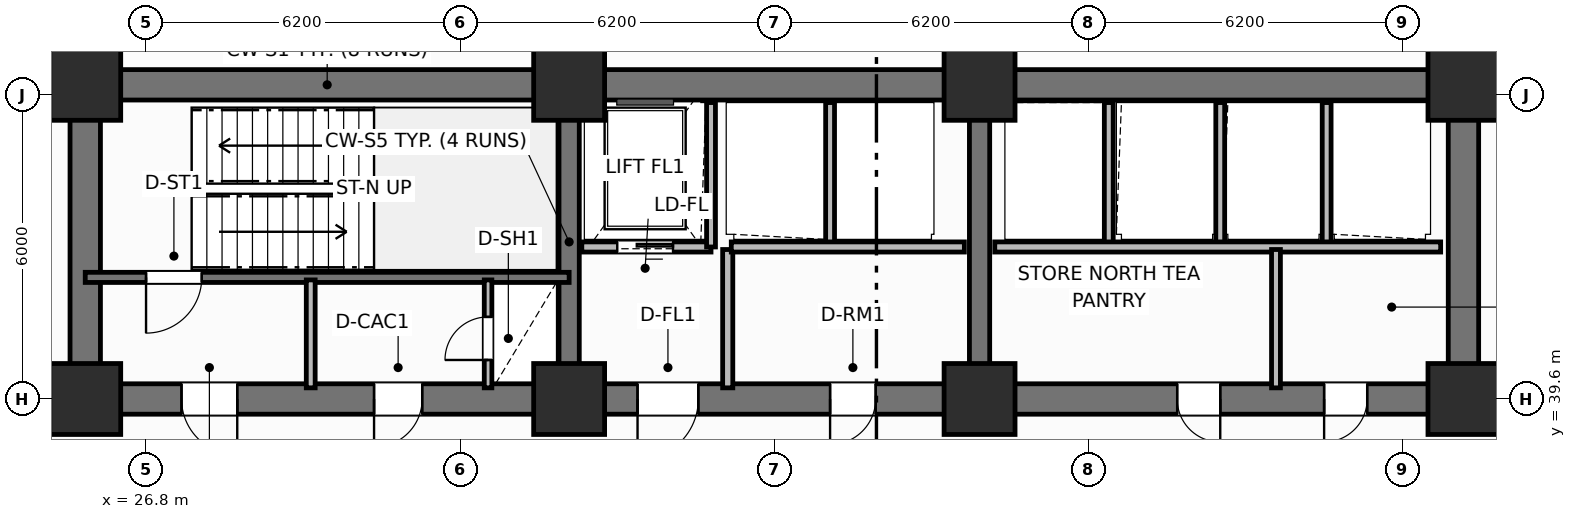
"""IFC4 building model, lengths in metres.
Left out: names, types, materials, properties, quantities, classifications, styles, units other than length and angle.
Written with IfcOpenShell. Run it as: python <this file> out.ifc"""

import sys

from ifc_helpers import new_model, si_unit, direction, frame, frame_2d, origin, origin_2d, place, context, subcontext, project, spatial, rectangle, extrude, element, fill, save


model = new_model("IFC4")
c1 = context("Model", 3, precision=1e-05, world=origin(), true_north=direction((0.0, 1.0)))
c2 = subcontext(c1, "Body", "Model", "MODEL_VIEW")
j1 = project(units=[si_unit("LENGTHUNIT", "METRE"), si_unit("PLANEANGLEUNIT", "RADIAN")], contexts=[c1])
p1 = place(None, origin())
s1 = spatial("IfcSite", under=j1, at=p1, CompositionType="ELEMENT")
p2 = place(p1, origin())
s2 = spatial("IfcBuilding", under=s1, at=p2, CompositionType="ELEMENT")
p3 = place(p2, frame((0.0, 0.0, 20.1)))
s3 = spatial("IfcBuildingStorey", under=s2, at=p3, CompositionType="ELEMENT", Elevation=20.1)
p4 = place(p3, frame((25.6, 45.8, 0.0), z_axis=(0.0, 0.0, 1.0), x_axis=(1.0, 0.0, 0.0)))
e1 = element("IfcWall", 1, at=p4, inside=s3, PredefinedType="SHEAR", context=c2, shape_type="SweptSolid", body=[
    extrude(rectangle(XDim=27.2, YDim=0.6, at=frame_2d((13.6, 0.0))), origin(), (0.0, 0.0, 1.0), 4.5),
])
for number, where, z_axis, x_axis in (
    (2, (25.6, 39.9, 0.0), (0.0, 0.0, 1.0), (0.0, 1.0, 0.0)),
    (3, (52.8, 39.9, 0.0), (0.0, 0.0, 1.0), (0.0, 1.0, 0.0)),
):
    element("IfcWall", number, at=place(p3, frame(where, z_axis=z_axis, x_axis=x_axis)), inside=s3, PredefinedType="SHEAR", context=c2, shape_type="SweptSolid", body=[
        extrude(rectangle(XDim=5.6, YDim=0.6, at=frame_2d((2.8, 0.0))), origin(), (0.0, 0.0, 1.0), 4.5),
    ])
p5 = place(p3, frame((52.8, 39.6, 0.0), z_axis=(0.0, 0.0, 1.0), x_axis=(-1.0, 0.0, 0.0)))
e4 = element("IfcWall", 4, at=p5, inside=s3, PredefinedType="SHEAR", context=c2, shape_type="SweptSolid", body=[
    extrude(rectangle(XDim=27.2, YDim=0.6, at=frame_2d((13.6, 0.0))), origin(), (0.0, 0.0, 1.0), 4.5),
])
p6 = place(p5, frame((24.2, 0.0, 0.0)))
e5 = element("IfcOpeningElement", 5, at=p6, cuts=e4, PredefinedType="OPENING", context=c2, shape_type="SweptSolid", body=[
    extrude(rectangle(XDim=1.1, YDim=2.15, at=frame_2d((0.55, 1.075))), frame((0.0, 0.31, 0.0), z_axis=(0.0, -1.0, 0.0), x_axis=(1.0, 0.0, 0.0)), (0.0, 0.0, 1.0), 0.62),
])
p7 = place(p5, frame((20.55, 0.0, 0.0)))
e6 = element("IfcOpeningElement", 6, at=p7, cuts=e4, PredefinedType="OPENING", context=c2, shape_type="SweptSolid", body=[
    extrude(rectangle(XDim=0.95, YDim=2.1, at=frame_2d((0.475, 1.05))), frame((0.0, 0.31, 0.0), z_axis=(0.0, -1.0, 0.0), x_axis=(1.0, 0.0, 0.0)), (0.0, 0.0, 1.0), 0.62),
])
p8 = place(p5, frame((15.1, 0.0, 0.0)))
e7 = element("IfcOpeningElement", 7, at=p8, cuts=e4, PredefinedType="OPENING", context=c2, shape_type="SweptSolid", body=[
    extrude(rectangle(XDim=1.2, YDim=2.15, at=frame_2d((0.6, 1.075))), frame((0.0, 0.31, 0.0), z_axis=(0.0, -1.0, 0.0), x_axis=(1.0, 0.0, 0.0)), (0.0, 0.0, 1.0), 0.62),
])
p9 = place(p5, frame((11.6, 0.0, 0.0)))
e8 = element("IfcOpeningElement", 8, at=p9, cuts=e4, PredefinedType="OPENING", context=c2, shape_type="SweptSolid", body=[
    extrude(rectangle(XDim=0.9, YDim=2.1, at=frame_2d((0.45, 1.05))), frame((0.0, 0.31, 0.0), z_axis=(0.0, -1.0, 0.0), x_axis=(1.0, 0.0, 0.0)), (0.0, 0.0, 1.0), 0.62),
])
p10 = place(p5, frame((4.8, 0.0, 0.0)))
e9 = element("IfcOpeningElement", 9, at=p10, cuts=e4, PredefinedType="OPENING", context=c2, shape_type="SweptSolid", body=[
    extrude(rectangle(XDim=0.85, YDim=2.1, at=frame_2d((0.425, 1.05))), frame((0.0, 0.31, 0.0), z_axis=(0.0, -1.0, 0.0), x_axis=(1.0, 0.0, 0.0)), (0.0, 0.0, 1.0), 0.62),
])
p11 = place(p5, frame((1.9, 0.0, 0.0)))
e10 = element("IfcOpeningElement", 10, at=p11, cuts=e4, PredefinedType="OPENING", context=c2, shape_type="SweptSolid", body=[
    extrude(rectangle(XDim=0.85, YDim=2.1, at=frame_2d((0.425, 1.05))), frame((0.0, 0.31, 0.0), z_axis=(0.0, -1.0, 0.0), x_axis=(1.0, 0.0, 0.0)), (0.0, 0.0, 1.0), 0.62),
])
for number, where, z_axis, x_axis in (
    (11, (35.15, 39.9, 0.0), (0.0, 0.0, 1.0), (0.0, 1.0, 0.0)),
    (12, (43.25, 39.9, 0.0), (0.0, 0.0, 1.0), (0.0, 1.0, 0.0)),
):
    element("IfcWall", number, at=place(p3, frame(where, z_axis=z_axis, x_axis=x_axis)), inside=s3, PredefinedType="SHEAR", context=c2, shape_type="SweptSolid", body=[
        extrude(rectangle(XDim=5.6, YDim=0.4, at=frame_2d((2.8, 0.0))), origin(), (0.0, 0.0, 1.0), 4.5),
    ])
for number, where, z_axis, x_axis in (
    (13, (25.6, 39.6, 0.0), (0.0, 0.0, 1.0), (1.0, 0.0, 0.0)),
    (14, (25.6, 45.8, 0.0), (0.0, 0.0, 1.0), (1.0, 0.0, 0.0)),
    (15, (35.15, 39.6, 0.0), (0.0, 0.0, 1.0), (1.0, 0.0, 0.0)),
    (16, (35.15, 45.8, 0.0), (0.0, 0.0, 1.0), (1.0, 0.0, 0.0)),
    (17, (43.25, 39.6, 0.0), (0.0, 0.0, 1.0), (1.0, 0.0, 0.0)),
    (18, (43.25, 45.8, 0.0), (0.0, 0.0, 1.0), (1.0, 0.0, 0.0)),
    (19, (52.8, 39.6, 0.0), (0.0, 0.0, 1.0), (1.0, 0.0, 0.0)),
    (20, (52.8, 45.8, 0.0), (0.0, 0.0, 1.0), (1.0, 0.0, 0.0)),
):
    element("IfcColumn", number, at=place(p3, frame(where, z_axis=z_axis, x_axis=x_axis)), inside=s3, PredefinedType="COLUMN", context=c2, shape_type="SweptSolid", body=[
        extrude(rectangle(XDim=1.4, YDim=1.4, at=origin_2d()), origin(), (0.0, 0.0, 1.0), 4.5),
    ])
p12 = place(p3, frame((35.15, 42.0, 0.0), z_axis=(0.0, 0.0, 1.0), x_axis=(-1.0, 0.0, 0.0)))
e21 = element("IfcWall", 21, at=p12, inside=s3, PredefinedType="SHEAR", context=c2, shape_type="SweptSolid", body=[
    extrude(rectangle(XDim=9.55, YDim=0.2, at=frame_2d((4.775, 0.0))), origin(), (0.0, 0.0, 1.0), 4.5),
])
p13 = place(p12, frame((7.25, 0.0, 0.0)))
e22 = element("IfcOpeningElement", 22, at=p13, cuts=e21, PredefinedType="OPENING", context=c2, shape_type="SweptSolid", body=[
    extrude(rectangle(XDim=1.1, YDim=2.15, at=frame_2d((0.55, 1.075))), frame((0.0, 0.11, 0.0), z_axis=(0.0, -1.0, 0.0), x_axis=(1.0, 0.0, 0.0)), (0.0, 0.0, 1.0), 0.22),
])
p14 = place(p3, frame((33.55, 39.82, 0.0), z_axis=(0.0, 0.0, 1.0), x_axis=(0.0, 1.0, 0.0)))
e23 = element("IfcWall", 23, at=p14, inside=s3, PredefinedType="PARTITIONING", context=c2, shape_type="SweptSolid", body=[
    extrude(rectangle(XDim=2.13, YDim=0.15, at=frame_2d((1.065, 0.0))), origin(), (0.0, 0.0, 1.0), 2.26),
])
p15 = place(p14, frame((0.55, 0.0, 0.0)))
e24 = element("IfcOpeningElement", 24, at=p15, cuts=e23, PredefinedType="OPENING", context=c2, shape_type="SweptSolid", body=[
    extrude(rectangle(XDim=0.85, YDim=2.05, at=frame_2d((0.425, 1.025))), frame((0.0, 0.085, 0.0), z_axis=(0.0, -1.0, 0.0), x_axis=(1.0, 0.0, 0.0)), (0.0, 0.0, 1.0), 0.17),
])
p16 = place(p3, frame((30.05, 39.82, 0.0), z_axis=(0.0, 0.0, 1.0), x_axis=(0.0, 1.0, 0.0)))
e25 = element("IfcWall", 25, at=p16, inside=s3, PredefinedType="PARTITIONING", context=c2, shape_type="SweptSolid", body=[
    extrude(rectangle(XDim=2.13, YDim=0.175, at=frame_2d((1.065, 0.0))), origin(), (0.0, 0.0, 1.0), 2.26),
])
p17 = place(p3, frame((37.95, 42.6, 0.0), z_axis=(0.0, 0.0, 1.0), x_axis=(-1.0, 0.0, 0.0)))
e26 = element("IfcWall", 26, at=p17, inside=s3, PredefinedType="PARTITIONING", context=c2, shape_type="SweptSolid", body=[
    extrude(rectangle(XDim=2.55, YDim=0.2, at=frame_2d((1.275, 0.0))), origin(), (0.0, 0.0, 1.0), 2.26),
])
p18 = place(p17, frame((0.75, 0.0, 0.0)))
e27 = element("IfcOpeningElement", 27, at=p18, cuts=e26, PredefinedType="OPENING", context=c2, shape_type="SweptSolid", body=[
    extrude(rectangle(XDim=1.1, YDim=2.15, at=frame_2d((0.55, 1.075))), frame((0.0, 0.11, 0.0), z_axis=(0.0, -1.0, 0.0), x_axis=(1.0, 0.0, 0.0)), (0.0, 0.0, 1.0), 0.22),
])
p19 = place(p3, frame((37.95, 42.6, 0.0), z_axis=(0.0, 0.0, 1.0), x_axis=(0.0, 1.0, 0.0)))
e28 = element("IfcWall", 28, at=p19, inside=s3, PredefinedType="PARTITIONING", context=c2, shape_type="SweptSolid", body=[
    extrude(rectangle(XDim=2.85, YDim=0.175, at=frame_2d((1.425, 0.0))), origin(), (0.0, 0.0, 1.0), 2.26),
])
p20 = place(p3, frame((38.28, 39.82, 0.0), z_axis=(0.0, 0.0, 1.0), x_axis=(0.0, 1.0, 0.0)))
e29 = element("IfcWall", 29, at=p20, inside=s3, PredefinedType="PARTITIONING", context=c2, shape_type="SweptSolid", body=[
    extrude(rectangle(XDim=2.73, YDim=0.2, at=frame_2d((1.365, 0.0))), origin(), (0.0, 0.0, 1.0), 2.26),
])
p21 = place(p3, frame((40.3, 42.65, 0.0), z_axis=(0.0, 0.0, 1.0), x_axis=(0.0, 1.0, 0.0)))
e30 = element("IfcWall", 30, at=p21, inside=s3, PredefinedType="PARTITIONING", context=c2, shape_type="SweptSolid", body=[
    extrude(rectangle(XDim=2.8, YDim=0.175, at=frame_2d((1.4, 0.0))), origin(), (0.0, 0.0, 1.0), 2.26),
])
p22 = place(p3, frame((42.95, 42.6, 0.0), z_axis=(0.0, 0.0, 1.0), x_axis=(-1.0, 0.0, 0.0)))
e31 = element("IfcWall", 31, at=p22, inside=s3, PredefinedType="PARTITIONING", context=c2, shape_type="SweptSolid", body=[
    extrude(rectangle(XDim=4.6, YDim=0.2, at=frame_2d((2.3, 0.0))), origin(), (0.0, 0.0, 1.0), 2.26),
])
for number, where, z_axis, x_axis in (
    (32, (45.8, 42.65, 0.0), (0.0, 0.0, 1.0), (0.0, 1.0, 0.0)),
    (33, (48.0, 42.65, 0.0), (0.0, 0.0, 1.0), (0.0, 1.0, 0.0)),
    (34, (50.1, 42.65, 0.0), (0.0, 0.0, 1.0), (0.0, 1.0, 0.0)),
):
    element("IfcWall", number, at=place(p3, frame(where, z_axis=z_axis, x_axis=x_axis)), inside=s3, PredefinedType="PARTITIONING", context=c2, shape_type="SweptSolid", body=[
        extrude(rectangle(XDim=2.8, YDim=0.175, at=frame_2d((1.4, 0.0))), origin(), (0.0, 0.0, 1.0), 2.26),
    ])
p23 = place(p3, frame((52.35, 42.6, 0.0), z_axis=(0.0, 0.0, 1.0), x_axis=(-1.0, 0.0, 0.0)))
e35 = element("IfcWall", 35, at=p23, inside=s3, PredefinedType="PARTITIONING", context=c2, shape_type="SweptSolid", body=[
    extrude(rectangle(XDim=8.8, YDim=0.2, at=frame_2d((4.4, 0.0))), origin(), (0.0, 0.0, 1.0), 2.26),
])
p24 = place(p3, frame((49.1, 39.82, 0.0), z_axis=(0.0, 0.0, 1.0), x_axis=(0.0, 1.0, 0.0)))
e36 = element("IfcWall", 36, at=p24, inside=s3, PredefinedType="PARTITIONING", context=c2, shape_type="SweptSolid", body=[
    extrude(rectangle(XDim=2.73, YDim=0.175, at=frame_2d((1.365, 0.0))), origin(), (0.0, 0.0, 1.0), 2.26),
])
p25 = place(p3, frame((25.25, 39.55, 0.0), z_axis=(0.0, 0.0, 1.0), x_axis=(-1.0, 0.0, 0.0)))
e37 = element("IfcWall", 37, at=p25, inside=s3, PredefinedType="PARTITIONING", context=c2, shape_type="SweptSolid", body=[
    extrude(rectangle(XDim=13.25, YDim=0.15, at=frame_2d((6.625, 0.0))), origin(), (0.0, 0.0, 1.0), 2.26),
])
p26 = place(p25, frame((4.2, 0.0, 0.0)))
e38 = element("IfcOpeningElement", 38, at=p26, cuts=e37, PredefinedType="OPENING", context=c2, shape_type="SweptSolid", body=[
    extrude(rectangle(XDim=1.0, YDim=2.15, at=frame_2d((0.5, 1.075))), frame((0.0, 0.085, 0.0), z_axis=(0.0, -1.0, 0.0), x_axis=(1.0, 0.0, 0.0)), (0.0, 0.0, 1.0), 0.17),
])
p27 = place(p3, frame((66.4, 39.55, 0.0), z_axis=(0.0, 0.0, 1.0), x_axis=(-1.0, 0.0, 0.0)))
e39 = element("IfcWall", 39, at=p27, inside=s3, PredefinedType="PARTITIONING", context=c2, shape_type="SweptSolid", body=[
    extrude(rectangle(XDim=13.25, YDim=0.15, at=frame_2d((6.625, 0.0))), origin(), (0.0, 0.0, 1.0), 2.26),
])
p28 = place(p27, frame((5.5, 0.0, 0.0)))
e40 = element("IfcOpeningElement", 40, at=p28, cuts=e39, PredefinedType="OPENING", context=c2, shape_type="SweptSolid", body=[
    extrude(rectangle(XDim=1.0, YDim=2.15, at=frame_2d((0.5, 1.075))), frame((0.0, 0.085, 0.0), z_axis=(0.0, -1.0, 0.0), x_axis=(1.0, 0.0, 0.0)), (0.0, 0.0, 1.0), 0.17),
])
p29 = place(p13, origin())
e41 = element("IfcDoor", 41, at=p29, inside=s3, OperationType="SINGLE_SWING_RIGHT", PredefinedType="DOOR", context=c2, shape_type="SweptSolid", body=[
    extrude(rectangle(XDim=1.1, YDim=2.15, at=frame_2d((0.55, 1.075))), frame((0.0, 0.025, 0.0), z_axis=(0.0, -1.0, 0.0), x_axis=(1.0, 0.0, 0.0)), (0.0, 0.0, 1.0), 0.05),
])
fill(e22, e41)
p30 = place(p15, origin())
e42 = element("IfcDoor", 42, at=p30, inside=s3, OperationType="SINGLE_SWING_LEFT", PredefinedType="TRAPDOOR", context=c2, shape_type="SweptSolid", body=[
    extrude(rectangle(XDim=0.85, YDim=2.05, at=frame_2d((0.425, 1.025))), frame((0.0, 0.025, 0.0), z_axis=(0.0, -1.0, 0.0), x_axis=(1.0, 0.0, 0.0)), (0.0, 0.0, 1.0), 0.05),
])
fill(e24, e42)
p31 = place(p18, origin())
e43 = element("IfcDoor", 43, at=p31, inside=s3, OperationType="SLIDING_TO_LEFT", PredefinedType="DOOR", context=c2, shape_type="SweptSolid", body=[
    extrude(rectangle(XDim=1.1, YDim=2.15, at=frame_2d((0.55, 1.075))), frame((0.0, 0.025, 0.0), z_axis=(0.0, -1.0, 0.0), x_axis=(1.0, 0.0, 0.0)), (0.0, 0.0, 1.0), 0.05),
])
fill(e27, e43)
p32 = place(p6, origin())
e44 = element("IfcDoor", 44, at=p32, inside=s3, OperationType="SINGLE_SWING_LEFT", PredefinedType="DOOR", context=c2, shape_type="SweptSolid", body=[
    extrude(rectangle(XDim=1.1, YDim=2.15, at=frame_2d((0.55, 1.075))), frame((0.0, 0.025, 0.0), z_axis=(0.0, -1.0, 0.0), x_axis=(1.0, 0.0, 0.0)), (0.0, 0.0, 1.0), 0.05),
])
fill(e5, e44)
p33 = place(p7, origin())
e45 = element("IfcDoor", 45, at=p33, inside=s3, OperationType="SINGLE_SWING_RIGHT", PredefinedType="DOOR", context=c2, shape_type="SweptSolid", body=[
    extrude(rectangle(XDim=0.95, YDim=2.1, at=frame_2d((0.475, 1.05))), frame((0.0, 0.025, 0.0), z_axis=(0.0, -1.0, 0.0), x_axis=(1.0, 0.0, 0.0)), (0.0, 0.0, 1.0), 0.05),
])
fill(e6, e45)
p34 = place(p8, origin())
e46 = element("IfcDoor", 46, at=p34, inside=s3, OperationType="SINGLE_SWING_RIGHT", PredefinedType="DOOR", context=c2, shape_type="SweptSolid", body=[
    extrude(rectangle(XDim=1.2, YDim=2.15, at=frame_2d((0.6, 1.075))), frame((0.0, 0.025, 0.0), z_axis=(0.0, -1.0, 0.0), x_axis=(1.0, 0.0, 0.0)), (0.0, 0.0, 1.0), 0.05),
])
fill(e7, e46)
p35 = place(p9, origin())
e47 = element("IfcDoor", 47, at=p35, inside=s3, OperationType="SINGLE_SWING_RIGHT", PredefinedType="DOOR", context=c2, shape_type="SweptSolid", body=[
    extrude(rectangle(XDim=0.9, YDim=2.1, at=frame_2d((0.45, 1.05))), frame((0.0, 0.025, 0.0), z_axis=(0.0, -1.0, 0.0), x_axis=(1.0, 0.0, 0.0)), (0.0, 0.0, 1.0), 0.05),
])
fill(e8, e47)
p36 = place(p10, origin())
e48 = element("IfcDoor", 48, at=p36, inside=s3, OperationType="SINGLE_SWING_LEFT", PredefinedType="DOOR", context=c2, shape_type="SweptSolid", body=[
    extrude(rectangle(XDim=0.85, YDim=2.1, at=frame_2d((0.425, 1.05))), frame((0.0, 0.025, 0.0), z_axis=(0.0, -1.0, 0.0), x_axis=(1.0, 0.0, 0.0)), (0.0, 0.0, 1.0), 0.05),
])
fill(e9, e48)
p37 = place(p11, origin())
e49 = element("IfcDoor", 49, at=p37, inside=s3, OperationType="SINGLE_SWING_RIGHT", PredefinedType="DOOR", context=c2, shape_type="SweptSolid", body=[
    extrude(rectangle(XDim=0.85, YDim=2.1, at=frame_2d((0.425, 1.05))), frame((0.0, 0.025, 0.0), z_axis=(0.0, -1.0, 0.0), x_axis=(1.0, 0.0, 0.0)), (0.0, 0.0, 1.0), 0.05),
])
fill(e10, e49)
save(model, sys.argv[1])
